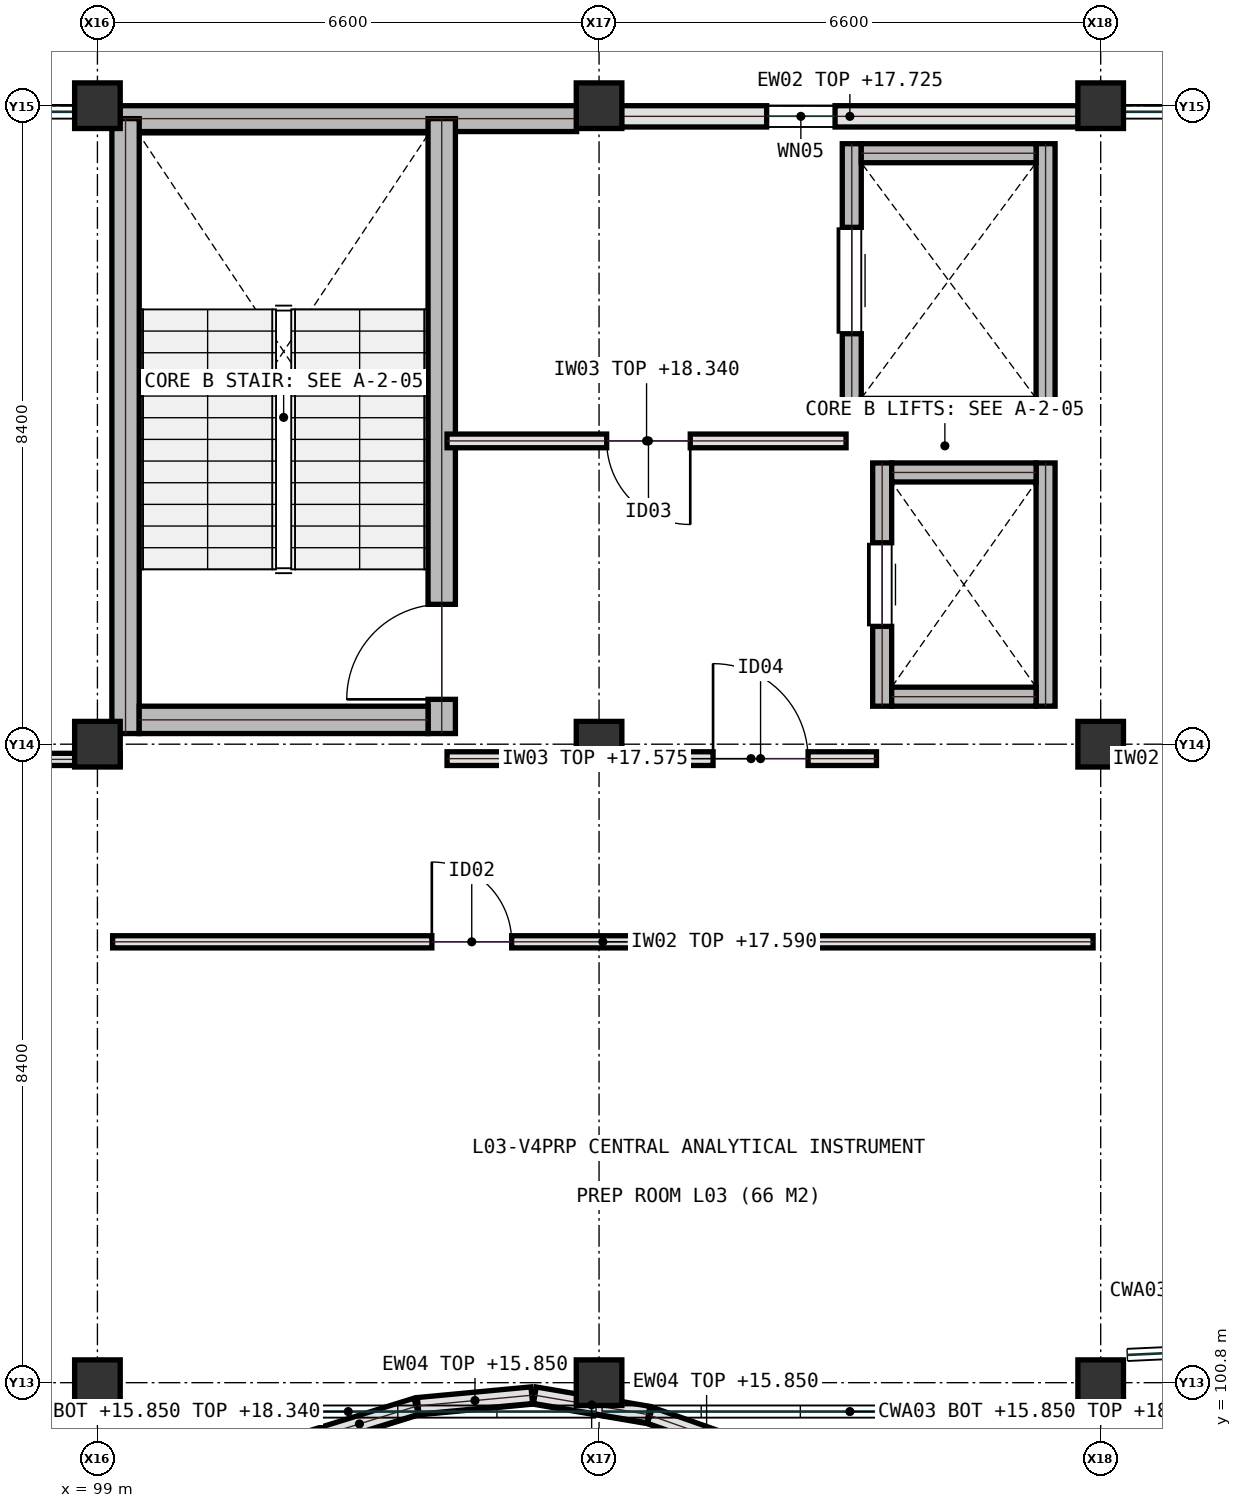
"""IFC4 building model, lengths in metres.
Left out: names, types, materials, properties, quantities, classifications, styles, units other than length and angle.
Written with IfcOpenShell. Run it as: python <this file> out.ifc"""

import sys

from ifc_helpers import new_model, si_unit, direction, frame, frame_2d, origin, origin_2d, place, context, subcontext, project, spatial, rectangle, extrude, element, fill, save


model = new_model("IFC4")
c1 = context("Model", 3, precision=1e-05, world=origin(), true_north=direction((0.0, 1.0)))
c2 = subcontext(c1, "Body", "Model", "MODEL_VIEW")
j1 = project(units=[si_unit("LENGTHUNIT", "METRE"), si_unit("PLANEANGLEUNIT", "RADIAN")], contexts=[c1])
p1 = place(None, origin())
s1 = spatial("IfcSite", under=j1, at=p1, CompositionType="ELEMENT")
p2 = place(p1, origin())
s2 = spatial("IfcBuilding", under=s1, at=p2, CompositionType="ELEMENT")
p3 = place(p2, frame((0.0, 0.0, 14.4)))
s3 = spatial("IfcBuildingStorey", under=s2, at=p3, CompositionType="ELEMENT", Elevation=14.4)
for number, where, z_axis, x_axis in (
    (1, (99.0, 100.8, 0.0), (0.0, 0.0, 1.0), (1.0, 0.0, 0.0)),
    (2, (99.0, 109.2, 0.0), (0.0, 0.0, 1.0), (1.0, 0.0, 0.0)),
    (3, (99.0, 117.6, 0.0), (0.0, 0.0, 1.0), (1.0, 0.0, 0.0)),
    (4, (105.6, 100.8, 0.0), (0.0, 0.0, 1.0), (1.0, 0.0, 0.0)),
    (5, (105.6, 109.2, 0.0), (0.0, 0.0, 1.0), (1.0, 0.0, 0.0)),
    (6, (105.6, 117.6, 0.0), (0.0, 0.0, 1.0), (1.0, 0.0, 0.0)),
    (7, (112.2, 100.8, 0.0), (0.0, 0.0, 1.0), (1.0, 0.0, 0.0)),
    (8, (112.2, 109.2, 0.0), (0.0, 0.0, 1.0), (1.0, 0.0, 0.0)),
    (9, (112.2, 117.6, 0.0), (0.0, 0.0, 1.0), (1.0, 0.0, 0.0)),
):
    element("IfcColumn", number, at=place(p3, frame(where, z_axis=z_axis, x_axis=x_axis)), inside=s3, PredefinedType="COLUMN", context=c2, shape_type="SweptSolid", body=[
        extrude(rectangle(XDim=0.6, YDim=0.6, at=origin_2d()), origin(), (0.0, 0.0, 1.0), 4.2),
    ])
p4 = place(p3, frame((92.85, 109.0, 0.0), z_axis=(0.0, 0.0, 1.0), x_axis=(1.0, 0.0, 0.0)))
e10 = element("IfcWall", 10, at=p4, inside=s3, PredefinedType="PARTITIONING", context=c2, shape_type="SweptSolid", body=[
    extrude(rectangle(XDim=6.45, YDim=0.16, at=frame_2d((3.225, 0.0))), origin(), (0.0, 0.0, 1.0), 3.175),
])
p5 = place(p3, frame((112.0, 109.0, 0.0), z_axis=(0.0, 0.0, 1.0), x_axis=(1.0, 0.0, 0.0)))
e11 = element("IfcWall", 11, at=p5, inside=s3, PredefinedType="PARTITIONING", context=c2, shape_type="SweptSolid", body=[
    extrude(rectangle(XDim=6.35, YDim=0.16, at=frame_2d((3.175, 0.0))), origin(), (0.0, 0.0, 1.0), 3.175),
])
p6 = place(p5, frame((4.55, 0.0, 0.0)))
e12 = element("IfcOpeningElement", 12, at=p6, cuts=e11, PredefinedType="OPENING", context=c2, shape_type="SweptSolid", body=[
    extrude(rectangle(XDim=1.45, YDim=2.25, at=frame_2d((0.725, 1.125))), frame((0.0, 0.09, 0.0), z_axis=(0.0, -1.0, 0.0), x_axis=(1.0, 0.0, 0.0)), (0.0, 0.0, 1.0), 0.18),
])
p7 = place(p3, frame((99.2, 106.6, 0.0), z_axis=(0.0, 0.0, 1.0), x_axis=(1.0, 0.0, 0.0)))
e13 = element("IfcWall", 13, at=p7, inside=s3, PredefinedType="PARTITIONING", context=c2, shape_type="SweptSolid", body=[
    extrude(rectangle(XDim=12.9, YDim=0.16, at=frame_2d((6.45, 0.0))), origin(), (0.0, 0.0, 1.0), 3.19),
])
p8 = place(p7, frame((4.2, 0.0, 0.0)))
e14 = element("IfcOpeningElement", 14, at=p8, cuts=e13, PredefinedType="OPENING", context=c2, shape_type="SweptSolid", body=[
    extrude(rectangle(XDim=1.05, YDim=2.15, at=frame_2d((0.525, 1.075))), frame((0.0, 0.09, 0.0), z_axis=(0.0, -1.0, 0.0), x_axis=(1.0, 0.0, 0.0)), (0.0, 0.0, 1.0), 0.18),
])
p9 = place(p3, frame((105.305, 117.43, 0.0), z_axis=(0.0, 0.0, 1.0), x_axis=(-1.0, 0.0, 0.0)))
e15 = element("IfcWall", 15, at=p9, inside=s3, PredefinedType="SHEAR", context=c2, shape_type="SweptSolid", body=[
    extrude(rectangle(XDim=6.01, YDim=0.34, at=frame_2d((3.005, 0.0))), origin(), (0.0, 0.0, 1.0), 3.94),
])
p10 = place(p3, frame((111.905, 117.46, 0.0), z_axis=(0.0, 0.0, 1.0), x_axis=(-1.0, 0.0, 0.0)))
e16 = element("IfcWall", 16, at=p10, inside=s3, PredefinedType="SOLIDWALL", context=c2, shape_type="SweptSolid", body=[
    extrude(rectangle(XDim=6.01, YDim=0.28, at=frame_2d((3.005, 0.0))), origin(), (0.0, 0.0, 1.0), 3.325),
])
p11 = place(p10, frame((3.2, 0.0, 0.95)))
e17 = element("IfcOpeningElement", 17, at=p11, cuts=e16, PredefinedType="OPENING", context=c2, shape_type="SweptSolid", body=[
    extrude(rectangle(XDim=0.9, YDim=1.4, at=frame_2d((0.45, 0.7))), frame((0.0, 0.15, 0.0), z_axis=(0.0, -1.0, 0.0), x_axis=(1.0, 0.0, 0.0)), (0.0, 0.0, 1.0), 0.3),
])
p12 = place(p3, frame((101.7, 100.025, 0.0), z_axis=(0.0, 0.0, 1.0), x_axis=(0.954867587054, 0.297031801655, 0.0)))
e18 = element("IfcWall", 18, at=p12, inside=s3, PredefinedType="SOLIDWALL", context=c2, shape_type="SweptSolid", body=[
    extrude(rectangle(XDim=1.566, YDim=0.22, at=frame_2d((0.783, 0.0))), origin(), (0.0, 0.0, 1.0), 1.45),
])
p13 = place(p3, frame((103.22, 100.495, 0.0), z_axis=(0.0, 0.0, 1.0), x_axis=(0.995651207458, 0.093159396126, 0.0)))
e19 = element("IfcWall", 19, at=p13, inside=s3, PredefinedType="SOLIDWALL", context=c2, shape_type="SweptSolid", body=[
    extrude(rectangle(XDim=1.502, YDim=0.22, at=frame_2d((0.751, 0.0))), origin(), (0.0, 0.0, 1.0), 1.45),
])
p14 = place(p3, frame((104.755, 100.635, 0.0), z_axis=(0.0, 0.0, 1.0), x_axis=(0.985751401612, -0.168208722189, 0.0)))
e20 = element("IfcWall", 20, at=p14, inside=s3, PredefinedType="SOLIDWALL", context=c2, shape_type="SweptSolid", body=[
    extrude(rectangle(XDim=1.517, YDim=0.22, at=frame_2d((0.758, 0.0))), origin(), (0.0, 0.0, 1.0), 1.45),
])
p15 = place(p3, frame((106.27, 100.37, 0.0), z_axis=(0.0, 0.0, 1.0), x_axis=(0.943135745447, -0.332407830322, 0.0)))
e21 = element("IfcWall", 21, at=p15, inside=s3, PredefinedType="SOLIDWALL", context=c2, shape_type="SweptSolid", body=[
    extrude(rectangle(XDim=1.58, YDim=0.22, at=frame_2d((0.79, 0.0))), origin(), (0.0, 0.0, 1.0), 1.45),
])
p16 = place(p3, frame((99.37, 109.34, 0.0), z_axis=(0.0, 0.0, 1.0), x_axis=(0.0, 1.0, 0.0)))
e22 = element("IfcWall", 22, at=p16, inside=s3, PredefinedType="SHEAR", context=c2, shape_type="SweptSolid", body=[
    extrude(rectangle(XDim=8.09, YDim=0.36, at=frame_2d((4.045, 0.0))), origin(), (0.0, 0.0, 1.0), 3.94),
])
p17 = place(p3, frame((103.53, 109.34, 0.0), z_axis=(0.0, 0.0, 1.0), x_axis=(0.0, 1.0, 0.0)))
e23 = element("IfcWall", 23, at=p17, inside=s3, PredefinedType="SHEAR", context=c2, shape_type="SweptSolid", body=[
    extrude(rectangle(XDim=8.09, YDim=0.36, at=frame_2d((4.045, 0.0))), origin(), (0.0, 0.0, 1.0), 3.94),
])
p18 = place(p17, frame((0.45, 0.0, 0.0)))
e24 = element("IfcOpeningElement", 24, at=p18, cuts=e23, PredefinedType="OPENING", context=c2, shape_type="SweptSolid", body=[
    extrude(rectangle(XDim=1.25, YDim=2.15, at=frame_2d((0.625, 1.075))), frame((0.0, 0.19, 0.0), z_axis=(0.0, -1.0, 0.0), x_axis=(1.0, 0.0, 0.0)), (0.0, 0.0, 1.0), 0.38),
])
p19 = place(p3, frame((99.55, 109.52, 0.0), z_axis=(0.0, 0.0, 1.0), x_axis=(1.0, 0.0, 0.0)))
e25 = element("IfcWall", 25, at=p19, inside=s3, PredefinedType="SHEAR", context=c2, shape_type="SweptSolid", body=[
    extrude(rectangle(XDim=3.8, YDim=0.36, at=frame_2d((1.9, 0.0))), origin(), (0.0, 0.0, 1.0), 3.94),
])
p20 = place(p3, frame((109.325, 109.7, 0.0), z_axis=(0.0, 0.0, 1.0), x_axis=(0.0, 1.0, 0.0)))
e26 = element("IfcWall", 26, at=p20, inside=s3, PredefinedType="SHEAR", context=c2, shape_type="SweptSolid", body=[
    extrude(rectangle(XDim=3.2, YDim=0.25, at=frame_2d((1.6, 0.0))), origin(), (0.0, 0.0, 1.0), 3.94),
])
p21 = place(p20, frame((1.05, 0.0, 0.0)))
e27 = element("IfcOpeningElement", 27, at=p21, cuts=e26, PredefinedType="OPENING", context=c2, shape_type="SweptSolid", body=[
    extrude(rectangle(XDim=1.1, YDim=2.15, at=frame_2d((0.55, 1.075))), frame((0.0, 0.135, 0.0), z_axis=(0.0, -1.0, 0.0), x_axis=(1.0, 0.0, 0.0)), (0.0, 0.0, 1.0), 0.27),
])
p22 = place(p3, frame((111.475, 109.7, 0.0), z_axis=(0.0, 0.0, 1.0), x_axis=(0.0, 1.0, 0.0)))
e28 = element("IfcWall", 28, at=p22, inside=s3, PredefinedType="SHEAR", context=c2, shape_type="SweptSolid", body=[
    extrude(rectangle(XDim=3.2, YDim=0.25, at=frame_2d((1.6, 0.0))), origin(), (0.0, 0.0, 1.0), 3.94),
])
for number, where, z_axis, x_axis in (
    (29, (109.45, 109.825, 0.0), (0.0, 0.0, 1.0), (1.0, 0.0, 0.0)),
    (30, (109.45, 112.775, 0.0), (0.0, 0.0, 1.0), (1.0, 0.0, 0.0)),
):
    element("IfcWall", number, at=place(p3, frame(where, z_axis=z_axis, x_axis=x_axis)), inside=s3, PredefinedType="SHEAR", context=c2, shape_type="SweptSolid", body=[
        extrude(rectangle(XDim=1.9, YDim=0.25, at=frame_2d((0.95, 0.0))), origin(), (0.0, 0.0, 1.0), 3.94),
    ])
p23 = place(p3, frame((108.925, 113.5, 0.0), z_axis=(0.0, 0.0, 1.0), x_axis=(0.0, 1.0, 0.0)))
e31 = element("IfcWall", 31, at=p23, inside=s3, PredefinedType="SHEAR", context=c2, shape_type="SweptSolid", body=[
    extrude(rectangle(XDim=3.6, YDim=0.25, at=frame_2d((1.8, 0.0))), origin(), (0.0, 0.0, 1.0), 3.94),
])
p24 = place(p23, frame((1.1, 0.0, 0.0)))
e32 = element("IfcOpeningElement", 32, at=p24, cuts=e31, PredefinedType="OPENING", context=c2, shape_type="SweptSolid", body=[
    extrude(rectangle(XDim=1.4, YDim=2.2, at=frame_2d((0.7, 1.1))), frame((0.0, 0.135, 0.0), z_axis=(0.0, -1.0, 0.0), x_axis=(1.0, 0.0, 0.0)), (0.0, 0.0, 1.0), 0.27),
])
p25 = place(p3, frame((111.475, 113.5, 0.0), z_axis=(0.0, 0.0, 1.0), x_axis=(0.0, 1.0, 0.0)))
e33 = element("IfcWall", 33, at=p25, inside=s3, PredefinedType="SHEAR", context=c2, shape_type="SweptSolid", body=[
    extrude(rectangle(XDim=3.6, YDim=0.25, at=frame_2d((1.8, 0.0))), origin(), (0.0, 0.0, 1.0), 3.94),
])
for number, where, z_axis, x_axis in (
    (34, (109.05, 113.625, 0.0), (0.0, 0.0, 1.0), (1.0, 0.0, 0.0)),
    (35, (109.05, 116.975, 0.0), (0.0, 0.0, 1.0), (1.0, 0.0, 0.0)),
):
    element("IfcWall", number, at=place(p3, frame(where, z_axis=z_axis, x_axis=x_axis)), inside=s3, PredefinedType="SHEAR", context=c2, shape_type="SweptSolid", body=[
        extrude(rectangle(XDim=2.3, YDim=0.25, at=frame_2d((1.15, 0.0))), origin(), (0.0, 0.0, 1.0), 3.94),
    ])
p26 = place(p3, frame((103.6, 109.01, 0.0), z_axis=(0.0, 0.0, 1.0), x_axis=(1.0, 0.0, 0.0)))
e36 = element("IfcWall", 36, at=p26, inside=s3, PredefinedType="SOLIDWALL", context=c2, shape_type="SweptSolid", body=[
    extrude(rectangle(XDim=1.65, YDim=0.18, at=frame_2d((0.825, 0.0))), origin(), (0.0, 0.0, 1.0), 3.175),
])
p27 = place(p3, frame((105.95, 109.01, 0.0), z_axis=(0.0, 0.0, 1.0), x_axis=(1.0, 0.0, 0.0)))
e37 = element("IfcWall", 37, at=p27, inside=s3, PredefinedType="SOLIDWALL", context=c2, shape_type="SweptSolid", body=[
    extrude(rectangle(XDim=3.3, YDim=0.18, at=frame_2d((1.65, 0.0))), origin(), (0.0, 0.0, 1.0), 3.175),
])
p28 = place(p27, frame((1.15, 0.0, 0.0)))
e38 = element("IfcOpeningElement", 38, at=p28, cuts=e37, PredefinedType="OPENING", context=c2, shape_type="SweptSolid", body=[
    extrude(rectangle(XDim=1.25, YDim=2.15, at=frame_2d((0.625, 1.075))), frame((0.0, 0.1, 0.0), z_axis=(0.0, -1.0, 0.0), x_axis=(1.0, 0.0, 0.0)), (0.0, 0.0, 1.0), 0.2),
])
p29 = place(p3, frame((103.6, 113.19, 0.0), z_axis=(0.0, 0.0, 1.0), x_axis=(1.0, 0.0, 0.0)))
e39 = element("IfcWall", 39, at=p29, inside=s3, PredefinedType="SOLIDWALL", context=c2, shape_type="SweptSolid", body=[
    extrude(rectangle(XDim=5.25, YDim=0.18, at=frame_2d((2.625, 0.0))), origin(), (0.0, 0.0, 1.0), 3.94),
])
p30 = place(p29, frame((2.1, 0.0, 0.0)))
e40 = element("IfcOpeningElement", 40, at=p30, cuts=e39, PredefinedType="OPENING", context=c2, shape_type="SweptSolid", body=[
    extrude(rectangle(XDim=1.1, YDim=2.15, at=frame_2d((0.55, 1.075))), frame((0.0, 0.1, 0.0), z_axis=(0.0, -1.0, 0.0), x_axis=(1.0, 0.0, 0.0)), (0.0, 0.0, 1.0), 0.2),
])
p31 = place(p8, origin())
e41 = element("IfcDoor", 41, at=p31, inside=s3, OperationType="SINGLE_SWING_LEFT", PredefinedType="DOOR", context=c2, shape_type="SweptSolid", body=[
    extrude(rectangle(XDim=1.05, YDim=2.15, at=frame_2d((0.525, 1.075))), frame((0.0, 0.025, 0.0), z_axis=(0.0, -1.0, 0.0), x_axis=(1.0, 0.0, 0.0)), (0.0, 0.0, 1.0), 0.05),
])
fill(e14, e41)
p32 = place(p11, origin())
e42 = element("IfcWindow", 42, at=p32, inside=s3, PartitioningType="SINGLE_PANEL", PredefinedType="WINDOW", context=c2, shape_type="SweptSolid", body=[
    extrude(rectangle(XDim=0.9, YDim=1.4, at=frame_2d((0.45, 0.7))), frame((0.0, 0.03, 0.0), z_axis=(0.0, -1.0, 0.0), x_axis=(1.0, 0.0, 0.0)), (0.0, 0.0, 1.0), 0.06),
])
fill(e17, e42)
p33 = place(p18, origin())
e43 = element("IfcDoor", 43, at=p33, inside=s3, OperationType="SINGLE_SWING_LEFT", PredefinedType="DOOR", context=c2, shape_type="SweptSolid", body=[
    extrude(rectangle(XDim=1.25, YDim=2.15, at=frame_2d((0.625, 1.075))), frame((0.0, 0.025, 0.0), z_axis=(0.0, -1.0, 0.0), x_axis=(1.0, 0.0, 0.0)), (0.0, 0.0, 1.0), 0.05),
])
fill(e24, e43)
p34 = place(p21, origin())
e44 = element("IfcDoor", 44, at=p34, inside=s3, OperationType="SLIDING_TO_LEFT", PredefinedType="DOOR", context=c2, shape_type="SweptSolid", body=[
    extrude(rectangle(XDim=1.1, YDim=2.15, at=frame_2d((0.55, 1.075))), frame((0.0, 0.025, 0.0), z_axis=(0.0, -1.0, 0.0), x_axis=(1.0, 0.0, 0.0)), (0.0, 0.0, 1.0), 0.05),
])
fill(e27, e44)
p35 = place(p24, origin())
e45 = element("IfcDoor", 45, at=p35, inside=s3, OperationType="SLIDING_TO_LEFT", PredefinedType="DOOR", context=c2, shape_type="SweptSolid", body=[
    extrude(rectangle(XDim=1.4, YDim=2.2, at=frame_2d((0.7, 1.1))), frame((0.0, 0.025, 0.0), z_axis=(0.0, -1.0, 0.0), x_axis=(1.0, 0.0, 0.0)), (0.0, 0.0, 1.0), 0.05),
])
fill(e32, e45)
p36 = place(p28, origin())
e46 = element("IfcDoor", 46, at=p36, inside=s3, OperationType="SINGLE_SWING_LEFT", PredefinedType="DOOR", context=c2, shape_type="SweptSolid", body=[
    extrude(rectangle(XDim=1.25, YDim=2.15, at=frame_2d((0.625, 1.075))), frame((0.0, 0.025, 0.0), z_axis=(0.0, -1.0, 0.0), x_axis=(1.0, 0.0, 0.0)), (0.0, 0.0, 1.0), 0.05),
])
fill(e38, e46)
p37 = place(p30, frame((1.1, 0.0, 0.0), z_axis=(0.0, 0.0, 1.0), x_axis=(-1.0, 0.0, 0.0)))
e47 = element("IfcDoor", 47, at=p37, inside=s3, OperationType="SINGLE_SWING_RIGHT", PredefinedType="DOOR", context=c2, shape_type="SweptSolid", body=[
    extrude(rectangle(XDim=1.1, YDim=2.15, at=frame_2d((0.55, 1.075))), frame((0.0, 0.025, 0.0), z_axis=(0.0, -1.0, 0.0), x_axis=(1.0, 0.0, 0.0)), (0.0, 0.0, 1.0), 0.05),
])
fill(e40, e47)
save(model, sys.argv[1])
